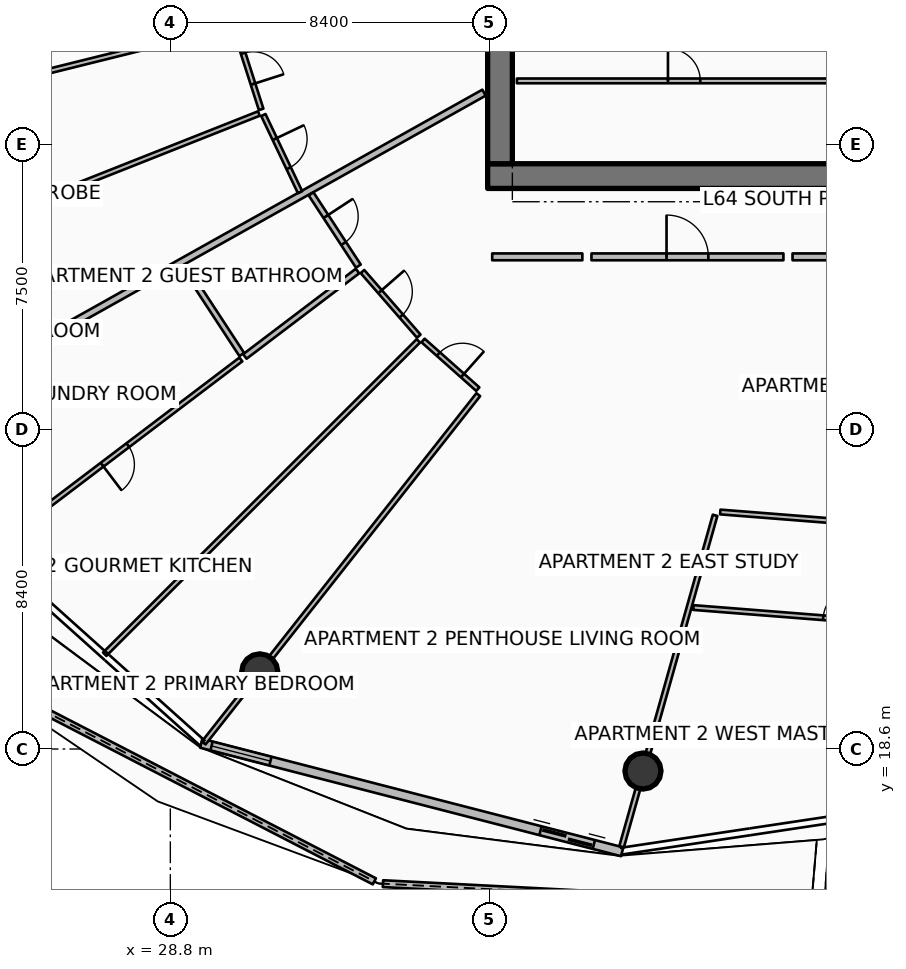
"""IFC4 building model, lengths in metres.
Left out: names, types, materials, properties, quantities, classifications, styles, units other than length and angle.
Written with IfcOpenShell. Run it as: python <this file> out.ifc"""

import sys

from ifc_helpers import new_model, si_unit, direction, frame, frame_2d, origin, origin_2d, place, context, subcontext, project, spatial, polyline, rectangle, circle, outline, extrude, element, fill, save


model = new_model("IFC4")
c1 = context("Model", 3, precision=1e-05, world=origin(), true_north=direction((0.0, 1.0)))
c2 = subcontext(c1, "Body", "Model", "MODEL_VIEW")
j1 = project(units=[si_unit("LENGTHUNIT", "METRE"), si_unit("PLANEANGLEUNIT", "RADIAN")], contexts=[c1])
p1 = place(None, origin())
s1 = spatial("IfcSite", under=j1, at=p1, CompositionType="ELEMENT")
p2 = place(p1, origin())
s2 = spatial("IfcBuilding", under=s1, at=p2, CompositionType="ELEMENT")
p3 = place(p2, frame((0.0, 0.0, 255.95)))
s3 = spatial("IfcBuildingStorey", under=s2, at=p3, CompositionType="ELEMENT", Elevation=255.95)
p4 = place(p3, frame((37.15, 33.675, 0.0), z_axis=(0.0, 0.0, 1.0), x_axis=(1.0, 0.0, 0.0)))
e1 = element("IfcWall", 1, at=p4, inside=s3, PredefinedType="SHEAR", context=c2, shape_type="SweptSolid", body=[
    extrude(rectangle(XDim=9.75, YDim=0.65, at=frame_2d((4.875, 0.0))), origin(), (0.0, 0.0, 1.0), 3.85),
])
p5 = place(p3, frame((37.475, 34.0, 0.0), z_axis=(0.0, 0.0, 1.0), x_axis=(0.0, 1.0, 0.0)))
e2 = element("IfcWall", 2, at=p5, inside=s3, PredefinedType="SHEAR", context=c2, shape_type="SweptSolid", body=[
    extrude(rectangle(XDim=16.0, YDim=0.65, at=frame_2d((8.0, 0.0))), origin(), (0.0, 0.0, 1.0), 3.85),
])
for number, where, z_axis, x_axis in (
    (3, (31.153, 20.629, 0.0), (0.0, 0.0, 1.0), (1.0, 0.0, 0.0)),
    (4, (41.237, 18.021, 0.0), (0.0, 0.0, 1.0), (1.0, 0.0, 0.0)),
):
    element("IfcColumn", number, at=place(p3, frame(where, z_axis=z_axis, x_axis=x_axis)), inside=s3, PredefinedType="COLUMN", context=c2, shape_type="SweptSolid", body=[
        extrude(circle(Radius=0.475, at=origin_2d()), origin(), (0.0, 0.0, 1.0), 3.59),
    ])
p6 = place(p3, frame((23.363, 20.696, 0.0), z_axis=(0.0, 0.0, 1.0), x_axis=(0.888586869338, -0.458708377556, 0.0)))
e5 = element("IfcWall", 5, at=p6, inside=s3, PredefinedType="PARAPET", context=c2, shape_type="SweptSolid", body=[
    extrude(outline(polyline([(0.0, 0.0), (12.16, 0.0), (12.16, 1.148), (6.08, 1.284), (0.0, 1.483), (0.0, 0.0)])), frame((0.0, 0.09, 0.0), z_axis=(0.0, -1.0, 0.0), x_axis=(1.0, 0.0, 0.0)), (0.0, 0.0, 1.0), 0.18),
])
p7 = place(p3, frame((34.395, 15.057, 0.0), z_axis=(0.0, 0.0, 1.0), x_axis=(0.998675719667, -0.051447127692, 0.0)))
e6 = element("IfcWall", 6, at=p7, inside=s3, PredefinedType="PARAPET", context=c2, shape_type="SweptSolid", body=[
    extrude(outline(polyline([(0.0, 0.0), (11.285, 0.0), (11.285, 1.224), (5.642, 1.127), (0.0, 1.148), (0.0, 0.0)])), frame((0.0, 0.09, 0.0), z_axis=(0.0, -1.0, 0.0), x_axis=(1.0, 0.0, 0.0)), (0.0, 0.0, 1.0), 0.18),
])
p8 = place(p3, frame((46.006, 14.514, 0.0), z_axis=(0.0, 0.0, 1.0), x_axis=(0.980919619001, 0.194413736807, 0.0)))
e7 = element("IfcWall", 7, at=p8, inside=s3, PredefinedType="PARAPET", context=c2, shape_type="SweptSolid", body=[
    extrude(outline(polyline([(0.0, 0.0), (10.344, 0.0), (10.344, 1.632), (5.172, 1.418), (0.0, 1.233), (0.0, 0.0)])), frame((0.0, 0.09, 0.0), z_axis=(0.0, -1.0, 0.0), x_axis=(1.0, 0.0, 0.0)), (0.0, 0.0, 1.0), 0.18),
])
p9 = place(p3, frame((29.614, 18.751, 0.0), z_axis=(0.0, 0.0, 1.0), x_axis=(0.968343758421, -0.249620442927, 0.0)))
e8 = element("IfcWall", 8, at=p9, inside=s3, PredefinedType="SOLIDWALL", context=c2, shape_type="SweptSolid", body=[
    extrude(rectangle(XDim=11.438, YDim=0.24, at=frame_2d((5.719, 0.0))), origin(), (0.0, 0.0, 1.0), 2.54),
])
p10 = place(p9, frame((9.218, 0.0, 0.0)))
e9 = element("IfcOpeningElement", 9, at=p10, cuts=e8, PredefinedType="OPENING", context=c2, shape_type="SweptSolid", body=[
    extrude(rectangle(XDim=1.45, YDim=2.15, at=frame_2d((0.725, 1.075))), frame((0.0, 0.13, 0.0), z_axis=(0.0, -1.0, 0.0), x_axis=(1.0, 0.0, 0.0)), (0.0, 0.0, 1.0), 0.26),
])
p11 = place(p9, frame((0.28, 0.0, 0.65)))
e10 = element("IfcOpeningElement", 10, at=p11, cuts=e8, PredefinedType="OPENING", context=c2, shape_type="SweptSolid", body=[
    extrude(rectangle(XDim=1.6, YDim=1.5, at=frame_2d((0.8, 0.75))), frame((0.0, 0.13, 0.0), z_axis=(0.0, -1.0, 0.0), x_axis=(1.0, 0.0, 0.0)), (0.0, 0.0, 1.0), 0.26),
])
p12 = place(p3, frame((37.92, 36.18, 0.0), z_axis=(0.0, 0.0, 1.0), x_axis=(1.0, 0.0, 0.0)))
e11 = element("IfcWall", 11, at=p12, inside=s3, PredefinedType="PARTITIONING", context=c2, shape_type="SweptSolid", body=[
    extrude(rectangle(XDim=8.8, YDim=0.125, at=frame_2d((4.4, 0.0))), origin(), (0.0, 0.0, 1.0), 3.03),
])
p13 = place(p12, frame((3.975, 0.0, 0.0)))
e12 = element("IfcOpeningElement", 12, at=p13, cuts=e11, PredefinedType="OPENING", context=c2, shape_type="SweptSolid", body=[
    extrude(rectangle(XDim=0.85, YDim=2.06, at=frame_2d((0.425, 1.03))), frame((0.0, 0.073, 0.0), z_axis=(0.0, -1.0, 0.0), x_axis=(1.0, 0.0, 0.0)), (0.0, 0.0, 1.0), 0.145),
])
p14 = place(p3, frame((37.054, 35.87, 0.0), z_axis=(0.0, 0.0, 1.0), x_axis=(-0.872490186067, -0.488631635506, 0.0)))
e13 = element("IfcWall", 13, at=p14, inside=s3, PredefinedType="PARTITIONING", context=c2, shape_type="SweptSolid", body=[
    extrude(rectangle(XDim=17.884, YDim=0.18, at=frame_2d((8.942, 0.0))), origin(), (0.0, 0.0, 1.0), 2.957),
])
p15 = place(p3, frame((30.391, 37.626, 0.0), z_axis=(0.0, 0.0, 1.0), x_axis=(-0.970503640625, -0.24108646485, 0.0)))
e14 = element("IfcWall", 14, at=p15, inside=s3, PredefinedType="PARTITIONING", context=c2, shape_type="SweptSolid", body=[
    extrude(rectangle(XDim=11.775, YDim=0.125, at=frame_2d((5.888, 0.0))), origin(), (0.0, 0.0, 1.0), 3.03),
])
p16 = place(p3, frame((31.13, 35.321, 0.0), z_axis=(0.0, 0.0, 1.0), x_axis=(-0.929773898428, -0.368131087796, 0.0)))
e15 = element("IfcWall", 15, at=p16, inside=s3, PredefinedType="PARTITIONING", context=c2, shape_type="SweptSolid", body=[
    extrude(rectangle(XDim=11.76, YDim=0.125, at=frame_2d((5.88, 0.0))), origin(), (0.0, 0.0, 1.0), 3.03),
])
p17 = place(p3, frame((30.503, 37.571, 0.0), z_axis=(0.0, 0.0, 1.0), x_axis=(0.305327243998, -0.952247485727, 0.0)))
e16 = element("IfcWall", 16, at=p17, inside=s3, PredefinedType="PARTITIONING", context=c2, shape_type="SweptSolid", body=[
    extrude(rectangle(XDim=2.249, YDim=0.125, at=frame_2d((1.124, 0.0))), origin(), (0.0, 0.0, 1.0), 3.03),
])
p18 = place(p17, frame((0.699, 0.0, 0.0)))
e17 = element("IfcOpeningElement", 17, at=p18, cuts=e16, PredefinedType="OPENING", context=c2, shape_type="SweptSolid", body=[
    extrude(rectangle(XDim=0.85, YDim=2.06, at=frame_2d((0.425, 1.03))), frame((0.0, 0.073, 0.0), z_axis=(0.0, -1.0, 0.0), x_axis=(1.0, 0.0, 0.0)), (0.0, 0.0, 1.0), 0.145),
])
p19 = place(p3, frame((31.248, 35.281, 0.0), z_axis=(0.0, 0.0, 1.0), x_axis=(0.429406696771, -0.903111227241, 0.0)))
e18 = element("IfcWall", 18, at=p19, inside=s3, PredefinedType="PARTITIONING", context=c2, shape_type="SweptSolid", body=[
    extrude(rectangle(XDim=2.249, YDim=0.125, at=frame_2d((1.124, 0.0))), origin(), (0.0, 0.0, 1.0), 2.957),
])
p20 = place(p19, frame((0.699, 0.0, 0.0)))
e19 = element("IfcOpeningElement", 19, at=p20, cuts=e18, PredefinedType="OPENING", context=c2, shape_type="SweptSolid", body=[
    extrude(rectangle(XDim=0.85, YDim=2.06, at=frame_2d((0.425, 1.03))), frame((0.0, 0.073, 0.0), z_axis=(0.0, -1.0, 0.0), x_axis=(1.0, 0.0, 0.0)), (0.0, 0.0, 1.0), 0.145),
])
p21 = place(p3, frame((39.882, 31.55, 0.0), z_axis=(0.0, 0.0, 1.0), x_axis=(1.0, 0.0, 0.0)))
e20 = element("IfcWall", 20, at=p21, inside=s3, PredefinedType="PARTITIONING", context=c2, shape_type="SweptSolid", body=[
    extrude(rectangle(XDim=5.051, YDim=0.18, at=frame_2d((2.525, 0.0))), origin(), (0.0, 0.0, 1.0), 2.957),
])
p22 = place(p21, frame((1.975, 0.0, 0.0)))
e21 = element("IfcOpeningElement", 21, at=p22, cuts=e20, PredefinedType="OPENING", context=c2, shape_type="SweptSolid", body=[
    extrude(rectangle(XDim=1.1, YDim=2.1, at=frame_2d((0.55, 1.05))), frame((0.0, 0.1, 0.0), z_axis=(0.0, -1.0, 0.0), x_axis=(1.0, 0.0, 0.0)), (0.0, 0.0, 1.0), 0.2),
])
p23 = place(p3, frame((37.27, 31.55, 0.0), z_axis=(0.0, 0.0, 1.0), x_axis=(1.0, 0.0, 0.0)))
e22 = element("IfcWall", 22, at=p23, inside=s3, PredefinedType="PARTITIONING", context=c2, shape_type="SweptSolid", body=[
    extrude(rectangle(XDim=2.372, YDim=0.18, at=frame_2d((1.186, 0.0))), origin(), (0.0, 0.0, 1.0), 2.957),
])
p24 = place(p3, frame((36.903, 27.924, 0.0), z_axis=(0.0, 0.0, 1.0), x_axis=(-0.619090039254, -0.785320013304, 0.0)))
e23 = element("IfcWall", 23, at=p24, inside=s3, PredefinedType="PARTITIONING", context=c2, shape_type="SweptSolid", body=[
    extrude(rectangle(XDim=11.672, YDim=0.125, at=frame_2d((5.836, 0.0))), origin(), (0.0, 0.0, 1.0), 2.957),
])
p25 = place(p3, frame((32.503, 33.207, 0.0), z_axis=(0.0, 0.0, 1.0), x_axis=(0.54776176335, -0.836634358972, 0.0)))
e24 = element("IfcWall", 24, at=p25, inside=s3, PredefinedType="PARTITIONING", context=c2, shape_type="SweptSolid", body=[
    extrude(rectangle(XDim=2.272, YDim=0.15, at=frame_2d((1.136, 0.0))), origin(), (0.0, 0.0, 1.0), 2.957),
])
p26 = place(p25, frame((0.711, 0.0, 0.0)))
e25 = element("IfcOpeningElement", 25, at=p26, cuts=e24, PredefinedType="OPENING", context=c2, shape_type="SweptSolid", body=[
    extrude(rectangle(XDim=0.85, YDim=2.06, at=frame_2d((0.425, 1.03))), frame((0.0, 0.085, 0.0), z_axis=(0.0, -1.0, 0.0), x_axis=(1.0, 0.0, 0.0)), (0.0, 0.0, 1.0), 0.17),
])
p27 = place(p3, frame((29.144, 31.326, 0.0), z_axis=(0.0, 0.0, 1.0), x_axis=(0.547727893033, -0.836656533587, 0.0)))
e26 = element("IfcWall", 26, at=p27, inside=s3, PredefinedType="PARTITIONING", context=c2, shape_type="SweptSolid", body=[
    extrude(rectangle(XDim=2.804, YDim=0.15, at=frame_2d((1.402, 0.0))), origin(), (0.0, 0.0, 1.0), 2.957),
])
p28 = place(p3, frame((33.725, 31.177, 0.0), z_axis=(0.0, 0.0, 1.0), x_axis=(-0.796854692537, -0.604171001441, 0.0)))
e27 = element("IfcWall", 27, at=p28, inside=s3, PredefinedType="PARTITIONING", context=c2, shape_type="SweptSolid", body=[
    extrude(rectangle(XDim=3.72, YDim=0.15, at=frame_2d((1.86, 0.0))), origin(), (0.0, 0.0, 1.0), 3.03),
])
p29 = place(p3, frame((30.657, 28.851, 0.0), z_axis=(0.0, 0.0, 1.0), x_axis=(-0.796843780875, -0.604185392807, 0.0)))
e28 = element("IfcWall", 28, at=p29, inside=s3, PredefinedType="PARTITIONING", context=c2, shape_type="SweptSolid", body=[
    extrude(rectangle(XDim=8.318, YDim=0.125, at=frame_2d((4.159, 0.0))), origin(), (0.0, 0.0, 1.0), 3.03),
])
p30 = place(p29, frame((3.734, 0.0, 0.0)))
e29 = element("IfcOpeningElement", 29, at=p30, cuts=e28, PredefinedType="OPENING", context=c2, shape_type="SweptSolid", body=[
    extrude(rectangle(XDim=0.85, YDim=2.06, at=frame_2d((0.425, 1.03))), frame((0.0, 0.073, 0.0), z_axis=(0.0, -1.0, 0.0), x_axis=(1.0, 0.0, 0.0)), (0.0, 0.0, 1.0), 0.145),
])
p31 = place(p3, frame((35.326, 29.34, 0.0), z_axis=(0.0, 0.0, 1.0), x_axis=(-0.707472916484, -0.706740456208, 0.0)))
e30 = element("IfcWall", 30, at=p31, inside=s3, PredefinedType="PARTITIONING", context=c2, shape_type="SweptSolid", body=[
    extrude(rectangle(XDim=11.666, YDim=0.125, at=frame_2d((5.833, 0.0))), origin(), (0.0, 0.0, 1.0), 3.03),
])
p32 = place(p3, frame((33.856, 31.163, 0.0), z_axis=(0.0, 0.0, 1.0), x_axis=(0.656985315096, -0.753903372952, 0.0)))
e31 = element("IfcWall", 31, at=p32, inside=s3, PredefinedType="PARTITIONING", context=c2, shape_type="SweptSolid", body=[
    extrude(rectangle(XDim=2.255, YDim=0.125, at=frame_2d((1.127, 0.0))), origin(), (0.0, 0.0, 1.0), 3.03),
])
p33 = place(p32, frame((0.702, 0.0, 0.0)))
e32 = element("IfcOpeningElement", 32, at=p33, cuts=e31, PredefinedType="OPENING", context=c2, shape_type="SweptSolid", body=[
    extrude(rectangle(XDim=0.85, YDim=2.06, at=frame_2d((0.425, 1.03))), frame((0.0, 0.073, 0.0), z_axis=(0.0, -1.0, 0.0), x_axis=(1.0, 0.0, 0.0)), (0.0, 0.0, 1.0), 0.145),
])
p34 = place(p3, frame((35.45, 29.35, 0.0), z_axis=(0.0, 0.0, 1.0), x_axis=(0.747360411924, -0.664418854857, 0.0)))
e33 = element("IfcWall", 33, at=p34, inside=s3, PredefinedType="PARTITIONING", context=c2, shape_type="SweptSolid", body=[
    extrude(rectangle(XDim=1.928, YDim=0.125, at=frame_2d((0.964, 0.0))), origin(), (0.0, 0.0, 1.0), 2.957),
])
p35 = place(p34, frame((0.539, 0.0, 0.0)))
e34 = element("IfcOpeningElement", 34, at=p35, cuts=e33, PredefinedType="OPENING", context=c2, shape_type="SweptSolid", body=[
    extrude(rectangle(XDim=0.85, YDim=2.06, at=frame_2d((0.425, 1.03))), frame((0.0, 0.073, 0.0), z_axis=(0.0, -1.0, 0.0), x_axis=(1.0, 0.0, 0.0)), (0.0, 0.0, 1.0), 0.145),
])
p36 = place(p3, frame((45.173, 31.55, 0.0), z_axis=(0.0, 0.0, 1.0), x_axis=(1.0, 0.0, 0.0)))
e35 = element("IfcWall", 35, at=p36, inside=s3, PredefinedType="PARTITIONING", context=c2, shape_type="SweptSolid", body=[
    extrude(rectangle(XDim=3.944, YDim=0.18, at=frame_2d((1.972, 0.0))), origin(), (0.0, 0.0, 1.0), 2.957),
])
p37 = place(p3, frame((43.135, 24.749, 0.0), z_axis=(0.0, 0.0, 1.0), x_axis=(-0.271445445258, -0.962453827593, 0.0)))
e36 = element("IfcWall", 36, at=p37, inside=s3, PredefinedType="PARTITIONING", context=c2, shape_type="SweptSolid", body=[
    extrude(rectangle(XDim=9.061, YDim=0.125, at=frame_2d((4.53, 0.0))), origin(), (0.0, 0.0, 1.0), 2.957),
])
p38 = place(p3, frame((43.271, 24.837, 0.0), z_axis=(0.0, 0.0, 1.0), x_axis=(0.996915339886, -0.078484425849, 0.0)))
e37 = element("IfcWall", 37, at=p38, inside=s3, PredefinedType="PARTITIONING", context=c2, shape_type="SweptSolid", body=[
    extrude(rectangle(XDim=6.735, YDim=0.125, at=frame_2d((3.367, 0.0))), origin(), (0.0, 0.0, 1.0), 2.957),
])
p39 = place(p38, frame((2.917, 0.0, 0.0)))
e38 = element("IfcOpeningElement", 38, at=p39, cuts=e37, PredefinedType="OPENING", context=c2, shape_type="SweptSolid", body=[
    extrude(rectangle(XDim=0.9, YDim=2.08, at=frame_2d((0.45, 1.04))), frame((0.0, 0.073, 0.0), z_axis=(0.0, -1.0, 0.0), x_axis=(1.0, 0.0, 0.0)), (0.0, 0.0, 1.0), 0.145),
])
p40 = place(p3, frame((42.562, 22.323, 0.0), z_axis=(0.0, 0.0, 1.0), x_axis=(0.996916778928, -0.078466144881, 0.0)))
e39 = element("IfcWall", 39, at=p40, inside=s3, PredefinedType="PARTITIONING", context=c2, shape_type="SweptSolid", body=[
    extrude(rectangle(XDim=7.754, YDim=0.125, at=frame_2d((3.877, 0.0))), origin(), (0.0, 0.0, 1.0), 2.957),
])
p41 = place(p40, frame((3.427, 0.0, 0.0)))
e40 = element("IfcOpeningElement", 40, at=p41, cuts=e39, PredefinedType="OPENING", context=c2, shape_type="SweptSolid", body=[
    extrude(rectangle(XDim=0.9, YDim=2.08, at=frame_2d((0.45, 1.04))), frame((0.0, 0.073, 0.0), z_axis=(0.0, -1.0, 0.0), x_axis=(1.0, 0.0, 0.0)), (0.0, 0.0, 1.0), 0.145),
])
p42 = place(p10, origin())
e41 = element("IfcDoor", 41, at=p42, inside=s3, OperationType="DOUBLE_DOOR_SLIDING", PredefinedType="DOOR", context=c2, shape_type="SweptSolid", body=[
    extrude(rectangle(XDim=1.45, YDim=2.15, at=frame_2d((0.725, 1.075))), frame((0.0, 0.025, 0.0), z_axis=(0.0, -1.0, 0.0), x_axis=(1.0, 0.0, 0.0)), (0.0, 0.0, 1.0), 0.05),
])
fill(e9, e41)
p43 = place(p11, origin())
e42 = element("IfcWindow", 42, at=p43, inside=s3, PartitioningType="SINGLE_PANEL", PredefinedType="WINDOW", context=c2, shape_type="SweptSolid", body=[
    extrude(rectangle(XDim=1.6, YDim=1.5, at=frame_2d((0.8, 0.75))), frame((0.0, 0.03, 0.0), z_axis=(0.0, -1.0, 0.0), x_axis=(1.0, 0.0, 0.0)), (0.0, 0.0, 1.0), 0.06),
])
fill(e10, e42)
p44 = place(p13, origin())
e43 = element("IfcDoor", 43, at=p44, inside=s3, OperationType="SINGLE_SWING_LEFT", PredefinedType="DOOR", context=c2, shape_type="SweptSolid", body=[
    extrude(rectangle(XDim=0.85, YDim=2.06, at=frame_2d((0.425, 1.03))), frame((0.0, 0.025, 0.0), z_axis=(0.0, -1.0, 0.0), x_axis=(1.0, 0.0, 0.0)), (0.0, 0.0, 1.0), 0.05),
])
fill(e12, e43)
p45 = place(p18, origin())
e44 = element("IfcDoor", 44, at=p45, inside=s3, OperationType="SINGLE_SWING_RIGHT", PredefinedType="DOOR", context=c2, shape_type="SweptSolid", body=[
    extrude(rectangle(XDim=0.85, YDim=2.06, at=frame_2d((0.425, 1.03))), frame((0.0, 0.025, 0.0), z_axis=(0.0, -1.0, 0.0), x_axis=(1.0, 0.0, 0.0)), (0.0, 0.0, 1.0), 0.05),
])
fill(e17, e44)
p46 = place(p20, origin())
e45 = element("IfcDoor", 45, at=p46, inside=s3, OperationType="SINGLE_SWING_LEFT", PredefinedType="DOOR", context=c2, shape_type="SweptSolid", body=[
    extrude(rectangle(XDim=0.85, YDim=2.06, at=frame_2d((0.425, 1.03))), frame((0.0, 0.025, 0.0), z_axis=(0.0, -1.0, 0.0), x_axis=(1.0, 0.0, 0.0)), (0.0, 0.0, 1.0), 0.05),
])
fill(e19, e45)
p47 = place(p22, origin())
e46 = element("IfcDoor", 46, at=p47, inside=s3, OperationType="SINGLE_SWING_LEFT", PredefinedType="DOOR", context=c2, shape_type="SweptSolid", body=[
    extrude(rectangle(XDim=1.1, YDim=2.1, at=frame_2d((0.55, 1.05))), frame((0.0, 0.025, 0.0), z_axis=(0.0, -1.0, 0.0), x_axis=(1.0, 0.0, 0.0)), (0.0, 0.0, 1.0), 0.05),
])
fill(e21, e46)
p48 = place(p26, origin())
e47 = element("IfcDoor", 47, at=p48, inside=s3, OperationType="SINGLE_SWING_LEFT", PredefinedType="DOOR", context=c2, shape_type="SweptSolid", body=[
    extrude(rectangle(XDim=0.85, YDim=2.06, at=frame_2d((0.425, 1.03))), frame((0.0, 0.025, 0.0), z_axis=(0.0, -1.0, 0.0), x_axis=(1.0, 0.0, 0.0)), (0.0, 0.0, 1.0), 0.05),
])
fill(e25, e47)
p49 = place(p30, origin())
e48 = element("IfcDoor", 48, at=p49, inside=s3, OperationType="SINGLE_SWING_RIGHT", PredefinedType="DOOR", context=c2, shape_type="SweptSolid", body=[
    extrude(rectangle(XDim=0.85, YDim=2.06, at=frame_2d((0.425, 1.03))), frame((0.0, 0.025, 0.0), z_axis=(0.0, -1.0, 0.0), x_axis=(1.0, 0.0, 0.0)), (0.0, 0.0, 1.0), 0.05),
])
fill(e29, e48)
p50 = place(p33, origin())
e49 = element("IfcDoor", 49, at=p50, inside=s3, OperationType="SINGLE_SWING_LEFT", PredefinedType="DOOR", context=c2, shape_type="SweptSolid", body=[
    extrude(rectangle(XDim=0.85, YDim=2.06, at=frame_2d((0.425, 1.03))), frame((0.0, 0.025, 0.0), z_axis=(0.0, -1.0, 0.0), x_axis=(1.0, 0.0, 0.0)), (0.0, 0.0, 1.0), 0.05),
])
fill(e32, e49)
p51 = place(p35, origin())
e50 = element("IfcDoor", 50, at=p51, inside=s3, OperationType="SINGLE_SWING_RIGHT", PredefinedType="DOOR", context=c2, shape_type="SweptSolid", body=[
    extrude(rectangle(XDim=0.85, YDim=2.06, at=frame_2d((0.425, 1.03))), frame((0.0, 0.025, 0.0), z_axis=(0.0, -1.0, 0.0), x_axis=(1.0, 0.0, 0.0)), (0.0, 0.0, 1.0), 0.05),
])
fill(e34, e50)
p52 = place(p41, origin())
e51 = element("IfcDoor", 51, at=p52, inside=s3, OperationType="SINGLE_SWING_RIGHT", PredefinedType="DOOR", context=c2, shape_type="SweptSolid", body=[
    extrude(rectangle(XDim=0.9, YDim=2.08, at=frame_2d((0.45, 1.04))), frame((0.0, 0.025, 0.0), z_axis=(0.0, -1.0, 0.0), x_axis=(1.0, 0.0, 0.0)), (0.0, 0.0, 1.0), 0.05),
])
fill(e40, e51)
save(model, sys.argv[1])
